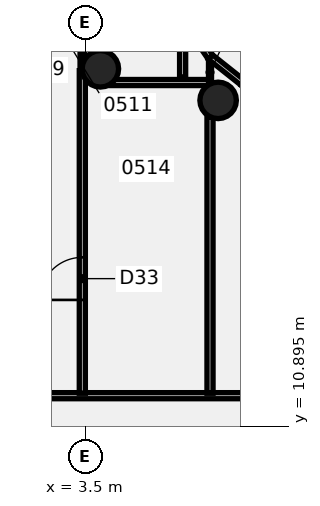
"""IFC4 building model, lengths in metres.
Left out: names, types, materials, properties, quantities, classifications, styles, units other than length and angle.
Written with IfcOpenShell. Run it as: python <this file> out.ifc"""

import sys

from ifc_helpers import new_model, si_unit, direction, frame, frame_2d, origin, origin_2d, place, context, subcontext, project, spatial, rectangle, circle, extrude, element, fill, save


model = new_model("IFC4")
c1 = context("Model", 3, precision=1e-05, world=origin(), true_north=direction((0.0, 1.0)))
c2 = subcontext(c1, "Body", "Model", "MODEL_VIEW")
j1 = project(units=[si_unit("LENGTHUNIT", "METRE"), si_unit("PLANEANGLEUNIT", "RADIAN")], contexts=[c1])
p1 = place(None, origin())
s1 = spatial("IfcSite", under=j1, at=p1, CompositionType="ELEMENT")
p2 = place(p1, origin())
s2 = spatial("IfcBuilding", under=s1, at=p2, CompositionType="ELEMENT")
p3 = place(p2, frame((0.0, 0.0, 29.5)))
s3 = spatial("IfcBuildingStorey", under=s2, at=p3, CompositionType="ELEMENT", Elevation=29.5)
for number, where, z_axis, x_axis in (
    (1, (7.866, 21.613, -0.6), (0.0, 0.0, 1.0), (1.0, 0.0, 0.0)),
    (2, (3.994, 22.651, -0.6), (0.0, 0.0, 1.0), (1.0, 0.0, 0.0)),
):
    element("IfcColumn", number, at=place(p3, frame(where, z_axis=z_axis, x_axis=x_axis)), inside=s3, PredefinedType="COLUMN", context=c2, shape_type="SweptSolid", body=[
        extrude(circle(Radius=0.6, at=origin_2d()), origin(), (0.0, 0.0, 1.0), 4.96),
    ])
p4 = place(p3, frame((-17.065, 11.9, 0.0), z_axis=(0.0, 0.0, 1.0), x_axis=(1.0, 0.0, 0.0)))
e3 = element("IfcWall", 3, at=p4, inside=s3, PredefinedType="PARTITIONING", context=c2, shape_type="SweptSolid", body=[
    extrude(rectangle(XDim=34.165, YDim=0.2, at=frame_2d((17.083, 0.0))), origin(), (0.0, 0.0, 1.0), 3.76),
])
p5 = place(p4, frame((16.215, 0.0, 0.0)))
e4 = element("IfcOpeningElement", 4, at=p5, cuts=e3, PredefinedType="OPENING", context=c2, shape_type="SweptSolid", body=[
    extrude(rectangle(XDim=1.8, YDim=2.1, at=frame_2d((0.9, 1.05))), frame((0.0, 0.11, 0.0), z_axis=(0.0, -1.0, 0.0), x_axis=(1.0, 0.0, 0.0)), (0.0, 0.0, 1.0), 0.22),
])
p6 = place(p4, frame((6.065, 0.0, 0.0)))
e5 = element("IfcOpeningElement", 5, at=p6, cuts=e3, PredefinedType="OPENING", context=c2, shape_type="SweptSolid", body=[
    extrude(rectangle(XDim=1.8, YDim=2.1, at=frame_2d((0.9, 1.05))), frame((0.0, 0.11, 0.0), z_axis=(0.0, -1.0, 0.0), x_axis=(1.0, 0.0, 0.0)), (0.0, 0.0, 1.0), 0.22),
])
p7 = place(p4, frame((31.065, 0.0, 0.0)))
e6 = element("IfcOpeningElement", 6, at=p7, cuts=e3, PredefinedType="OPENING", context=c2, shape_type="SweptSolid", body=[
    extrude(rectangle(XDim=1.8, YDim=2.1, at=frame_2d((0.9, 1.05))), frame((0.0, 0.11, 0.0), z_axis=(0.0, -1.0, 0.0), x_axis=(1.0, 0.0, 0.0)), (0.0, 0.0, 1.0), 0.22),
])
p8 = place(p3, frame((4.127, 22.2, 0.0), z_axis=(0.0, 0.0, 1.0), x_axis=(1.0, 0.0, 0.0)))
e7 = element("IfcWall", 7, at=p8, inside=s3, PredefinedType="PARTITIONING", context=c2, shape_type="SweptSolid", body=[
    extrude(rectangle(XDim=3.443, YDim=0.2, at=frame_2d((1.722, 0.0))), origin(), (0.0, 0.0, 1.0), 3.76),
])
p9 = place(p3, frame((3.4, 11.98, 0.0), z_axis=(0.0, 0.0, 1.0), x_axis=(0.0, 1.0, 0.0)))
e8 = element("IfcWall", 8, at=p9, inside=s3, PredefinedType="PARTITIONING", context=c2, shape_type="SweptSolid", body=[
    extrude(rectangle(XDim=10.611, YDim=0.2, at=frame_2d((5.305, 0.0))), origin(), (0.0, 0.0, 1.0), 3.76),
])
p10 = place(p9, frame((3.07, 0.0, 0.0)))
e9 = element("IfcOpeningElement", 9, at=p10, cuts=e8, PredefinedType="OPENING", context=c2, shape_type="SweptSolid", body=[
    extrude(rectangle(XDim=1.4, YDim=2.1, at=frame_2d((0.7, 1.05))), frame((0.0, 0.11, 0.0), z_axis=(0.0, -1.0, 0.0), x_axis=(1.0, 0.0, 0.0)), (0.0, 0.0, 1.0), 0.22),
])
p11 = place(p3, frame((3.4, 22.711, 0.0), z_axis=(0.0, 0.0, 1.0), x_axis=(0.0, 1.0, 0.0)))
e10 = element("IfcWall", 10, at=p11, inside=s3, PredefinedType="PARTITIONING", context=c2, shape_type="SweptSolid", body=[
    extrude(rectangle(XDim=3.004, YDim=0.15, at=frame_2d((1.502, 0.0))), origin(), (0.0, 0.0, 1.0), 3.76),
])
p12 = place(p3, frame((7.6, 11.98, 0.0), z_axis=(0.0, 0.0, 1.0), x_axis=(0.0, 1.0, 0.0)))
e11 = element("IfcWall", 11, at=p12, inside=s3, PredefinedType="PARTITIONING", context=c2, shape_type="SweptSolid", body=[
    extrude(rectangle(XDim=9.094, YDim=0.2, at=frame_2d((4.547, 0.0))), origin(), (0.0, 0.0, 1.0), 3.76),
])
p13 = place(p3, frame((7.6, 22.152, 0.0), z_axis=(0.0, 0.0, 1.0), x_axis=(0.0, 1.0, 0.0)))
e12 = element("IfcWall", 12, at=p13, inside=s3, PredefinedType="PARTITIONING", context=c2, shape_type="SweptSolid", body=[
    extrude(rectangle(XDim=0.769, YDim=0.1, at=frame_2d((0.385, 0.0))), origin(), (0.0, 0.0, 1.0), 3.76),
])
p14 = place(p3, frame((6.699, 25.8, 0.0), z_axis=(0.0, 0.0, 1.0), x_axis=(0.0, -1.0, 0.0)))
e13 = element("IfcWall", 13, at=p14, inside=s3, PredefinedType="PARTITIONING", context=c2, shape_type="SweptSolid", body=[
    extrude(rectangle(XDim=3.42, YDim=0.2, at=frame_2d((1.71, 0.0))), origin(), (0.0, 0.0, 1.0), 3.76),
])
p15 = place(p3, frame((8.687, 22.185, 0.0), z_axis=(0.0, 0.0, 1.0), x_axis=(-0.782754463559, 0.62233065952, 0.0)))
e14 = element("IfcWall", 14, at=p15, inside=s3, PredefinedType="SOLIDWALL", context=c2, shape_type="SweptSolid", body=[
    extrude(rectangle(XDim=1.374, YDim=0.2, at=frame_2d((0.687, 0.0))), origin(), (0.0, 0.0, 1.0), 4.36),
])
p16 = place(p3, frame((7.611, 23.041, 0.0), z_axis=(0.0, 0.0, 1.0), x_axis=(-0.564082170033, 0.825718659987, 0.0)))
e15 = element("IfcWall", 15, at=p16, inside=s3, PredefinedType="SOLIDWALL", context=c2, shape_type="SweptSolid", body=[
    extrude(rectangle(XDim=0.64, YDim=0.2, at=frame_2d((0.32, 0.0))), origin(), (0.0, 0.0, 1.0), 4.36),
])
p17 = place(p10, frame((1.4, 0.0, 0.0), z_axis=(0.0, 0.0, 1.0), x_axis=(-1.0, 0.0, 0.0)))
e16 = element("IfcDoor", 16, at=p17, inside=s3, OperationType="DOUBLE_DOOR_SINGLE_SWING", PredefinedType="DOOR", context=c2, shape_type="SweptSolid", body=[
    extrude(rectangle(XDim=1.4, YDim=2.1, at=frame_2d((0.7, 1.05))), frame((0.0, 0.025, 0.0), z_axis=(0.0, -1.0, 0.0), x_axis=(1.0, 0.0, 0.0)), (0.0, 0.0, 1.0), 0.05),
])
fill(e9, e16)
save(model, sys.argv[1])
